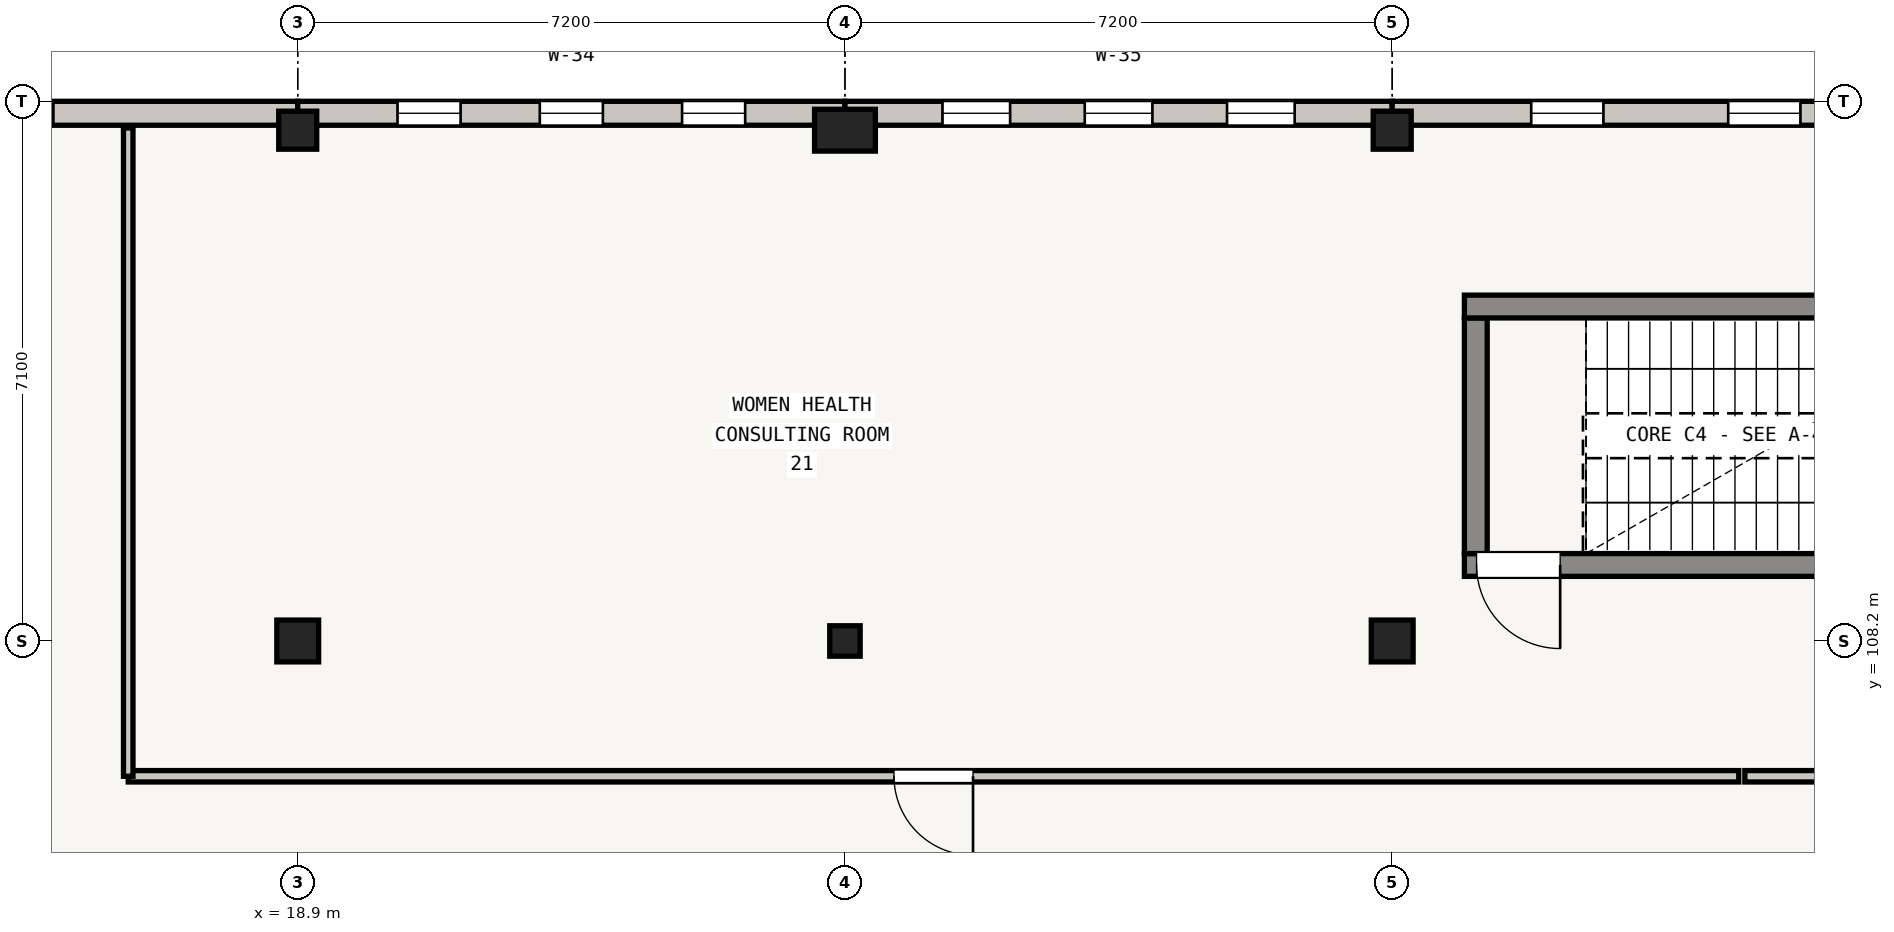
"""IFC4 building model, lengths in metres.
Left out: names, types, materials, properties, quantities, classifications, styles, units other than length and angle.
Written with IfcOpenShell. Run it as: python <this file> out.ifc"""

import sys

from ifc_helpers import new_model, si_unit, direction, frame, frame_2d, origin, origin_2d, place, context, subcontext, project, spatial, rectangle, extrude, element, fill, save


model = new_model("IFC4")
c1 = context("Model", 3, precision=1e-05, world=origin(), true_north=direction((0.0, 1.0)))
c2 = subcontext(c1, "Body", "Model", "MODEL_VIEW")
j1 = project(units=[si_unit("LENGTHUNIT", "METRE"), si_unit("PLANEANGLEUNIT", "RADIAN")], contexts=[c1])
p1 = place(None, origin())
s1 = spatial("IfcSite", under=j1, at=p1, CompositionType="ELEMENT")
p2 = place(p1, origin())
s2 = spatial("IfcBuilding", under=s1, at=p2, CompositionType="ELEMENT")
p3 = place(p2, frame((0.0, 0.0, 8.7)))
s3 = spatial("IfcBuildingStorey", under=s2, at=p3, CompositionType="ELEMENT", Elevation=8.7)
p4 = place(p3, frame((18.9, 108.2, 0.0), z_axis=(0.0, 0.0, 1.0), x_axis=(1.0, 0.0, 0.0)))
e1 = element("IfcColumn", 1, at=p4, inside=s3, PredefinedType="COLUMN", context=c2, shape_type="SweptSolid", body=[
    extrude(rectangle(XDim=0.55, YDim=0.55, at=origin_2d()), origin(), (0.0, 0.0, 1.0), 3.935),
])
p5 = place(p3, frame((18.9, 114.92, 0.0), z_axis=(0.0, 0.0, 1.0), x_axis=(1.0, 0.0, 0.0)))
e2 = element("IfcColumn", 2, at=p5, inside=s3, PredefinedType="COLUMN", context=c2, shape_type="SweptSolid", body=[
    extrude(rectangle(XDim=0.5, YDim=0.5, at=origin_2d()), origin(), (0.0, 0.0, 1.0), 3.935),
])
p6 = place(p3, frame((26.1, 108.2, 0.0), z_axis=(0.0, 0.0, 1.0), x_axis=(1.0, 0.0, 0.0)))
e3 = element("IfcColumn", 3, at=p6, inside=s3, PredefinedType="COLUMN", context=c2, shape_type="SweptSolid", body=[
    extrude(rectangle(XDim=0.4, YDim=0.4, at=origin_2d()), origin(), (0.0, 0.0, 1.0), 3.935),
])
p7 = place(p3, frame((26.1, 114.92, 0.0), z_axis=(0.0, 0.0, 1.0), x_axis=(1.0, 0.0, 0.0)))
e4 = element("IfcColumn", 4, at=p7, inside=s3, PredefinedType="COLUMN", context=c2, shape_type="SweptSolid", body=[
    extrude(rectangle(XDim=0.8, YDim=0.55, at=origin_2d()), origin(), (0.0, 0.0, 1.0), 3.935),
])
p8 = place(p3, frame((33.3, 108.2, 0.0), z_axis=(0.0, 0.0, 1.0), x_axis=(1.0, 0.0, 0.0)))
e5 = element("IfcColumn", 5, at=p8, inside=s3, PredefinedType="COLUMN", context=c2, shape_type="SweptSolid", body=[
    extrude(rectangle(XDim=0.55, YDim=0.55, at=origin_2d()), origin(), (0.0, 0.0, 1.0), 3.935),
])
p9 = place(p3, frame((33.3, 114.92, 0.0), z_axis=(0.0, 0.0, 1.0), x_axis=(1.0, 0.0, 0.0)))
e6 = element("IfcColumn", 6, at=p9, inside=s3, PredefinedType="COLUMN", context=c2, shape_type="SweptSolid", body=[
    extrude(rectangle(XDim=0.5, YDim=0.5, at=origin_2d()), origin(), (0.0, 0.0, 1.0), 3.935),
])
p10 = place(p3, frame((11.7, 115.143, 0.0), z_axis=(0.0, 0.0, 1.0), x_axis=(1.0, 0.0, 0.0)))
e7 = element("IfcWall", 7, at=p10, inside=s3, PredefinedType="SOLIDWALL", context=c2, shape_type="SweptSolid", body=[
    extrude(rectangle(XDim=7.2, YDim=0.315, at=frame_2d((3.6, 0.0))), origin(), (0.0, 0.0, 1.0), 2.97),
])
p11 = place(p10, frame((3.215, 0.0, 0.55)))
e8 = element("IfcOpeningElement", 8, at=p11, cuts=e7, PredefinedType="OPENING", context=c2, shape_type="SweptSolid", body=[
    extrude(rectangle(XDim=0.77, YDim=2.06, at=frame_2d((0.385, 1.03))), frame((0.0, 0.157, 0.0), z_axis=(0.0, -1.0, 0.0), x_axis=(1.0, 0.0, 0.0)), (0.0, 0.0, 1.0), 0.315),
])
p12 = place(p3, frame((18.9, 115.143, 0.0), z_axis=(0.0, 0.0, 1.0), x_axis=(1.0, 0.0, 0.0)))
e9 = element("IfcWall", 9, at=p12, inside=s3, PredefinedType="SOLIDWALL", context=c2, shape_type="SweptSolid", body=[
    extrude(rectangle(XDim=7.2, YDim=0.315, at=frame_2d((3.6, 0.0))), origin(), (0.0, 0.0, 1.0), 2.97),
])
p13 = place(p12, frame((1.313, 0.0, 0.55)))
e10 = element("IfcOpeningElement", 10, at=p13, cuts=e9, PredefinedType="OPENING", context=c2, shape_type="SweptSolid", body=[
    extrude(rectangle(XDim=0.83, YDim=2.06, at=frame_2d((0.415, 1.03))), frame((0.0, 0.157, 0.0), z_axis=(0.0, -1.0, 0.0), x_axis=(1.0, 0.0, 0.0)), (0.0, 0.0, 1.0), 0.315),
])
p14 = place(p12, frame((3.185, 0.0, 0.55)))
e11 = element("IfcOpeningElement", 11, at=p14, cuts=e9, PredefinedType="OPENING", context=c2, shape_type="SweptSolid", body=[
    extrude(rectangle(XDim=0.83, YDim=2.06, at=frame_2d((0.415, 1.03))), frame((0.0, 0.157, 0.0), z_axis=(0.0, -1.0, 0.0), x_axis=(1.0, 0.0, 0.0)), (0.0, 0.0, 1.0), 0.315),
])
p15 = place(p12, frame((5.057, 0.0, 0.55)))
e12 = element("IfcOpeningElement", 12, at=p15, cuts=e9, PredefinedType="OPENING", context=c2, shape_type="SweptSolid", body=[
    extrude(rectangle(XDim=0.83, YDim=2.06, at=frame_2d((0.415, 1.03))), frame((0.0, 0.157, 0.0), z_axis=(0.0, -1.0, 0.0), x_axis=(1.0, 0.0, 0.0)), (0.0, 0.0, 1.0), 0.315),
])
p16 = place(p3, frame((26.1, 115.143, 0.0), z_axis=(0.0, 0.0, 1.0), x_axis=(1.0, 0.0, 0.0)))
e13 = element("IfcWall", 13, at=p16, inside=s3, PredefinedType="SOLIDWALL", context=c2, shape_type="SweptSolid", body=[
    extrude(rectangle(XDim=7.2, YDim=0.315, at=frame_2d((3.6, 0.0))), origin(), (0.0, 0.0, 1.0), 3.3),
])
p17 = place(p16, frame((1.283, 0.0, 0.55)))
e14 = element("IfcOpeningElement", 14, at=p17, cuts=e13, PredefinedType="OPENING", context=c2, shape_type="SweptSolid", body=[
    extrude(rectangle(XDim=0.89, YDim=2.02, at=frame_2d((0.445, 1.01))), frame((0.0, 0.157, 0.0), z_axis=(0.0, -1.0, 0.0), x_axis=(1.0, 0.0, 0.0)), (0.0, 0.0, 1.0), 0.315),
])
p18 = place(p16, frame((3.155, 0.0, 0.55)))
e15 = element("IfcOpeningElement", 15, at=p18, cuts=e13, PredefinedType="OPENING", context=c2, shape_type="SweptSolid", body=[
    extrude(rectangle(XDim=0.89, YDim=2.02, at=frame_2d((0.445, 1.01))), frame((0.0, 0.157, 0.0), z_axis=(0.0, -1.0, 0.0), x_axis=(1.0, 0.0, 0.0)), (0.0, 0.0, 1.0), 0.315),
])
p19 = place(p16, frame((5.027, 0.0, 0.55)))
e16 = element("IfcOpeningElement", 16, at=p19, cuts=e13, PredefinedType="OPENING", context=c2, shape_type="SweptSolid", body=[
    extrude(rectangle(XDim=0.89, YDim=2.02, at=frame_2d((0.445, 1.01))), frame((0.0, 0.157, 0.0), z_axis=(0.0, -1.0, 0.0), x_axis=(1.0, 0.0, 0.0)), (0.0, 0.0, 1.0), 0.315),
])
p20 = place(p3, frame((33.3, 115.143, 0.0), z_axis=(0.0, 0.0, 1.0), x_axis=(1.0, 0.0, 0.0)))
e17 = element("IfcWall", 17, at=p20, inside=s3, PredefinedType="SOLIDWALL", context=c2, shape_type="SweptSolid", body=[
    extrude(rectangle(XDim=7.2, YDim=0.315, at=frame_2d((3.6, 0.0))), origin(), (0.0, 0.0, 1.0), 3.32),
])
p21 = place(p20, frame((1.829, 0.0, 0.55)))
e18 = element("IfcOpeningElement", 18, at=p21, cuts=e17, PredefinedType="OPENING", context=c2, shape_type="SweptSolid", body=[
    extrude(rectangle(XDim=0.95, YDim=2.02, at=frame_2d((0.475, 1.01))), frame((0.0, 0.157, 0.0), z_axis=(0.0, -1.0, 0.0), x_axis=(1.0, 0.0, 0.0)), (0.0, 0.0, 1.0), 0.315),
])
p22 = place(p20, frame((4.421, 0.0, 0.55)))
e19 = element("IfcOpeningElement", 19, at=p22, cuts=e17, PredefinedType="OPENING", context=c2, shape_type="SweptSolid", body=[
    extrude(rectangle(XDim=0.95, YDim=2.02, at=frame_2d((0.475, 1.01))), frame((0.0, 0.157, 0.0), z_axis=(0.0, -1.0, 0.0), x_axis=(1.0, 0.0, 0.0)), (0.0, 0.0, 1.0), 0.315),
])
p23 = place(p3, frame((41.55, 109.2, 0.0), z_axis=(0.0, 0.0, 1.0), x_axis=(-1.0, 0.0, 0.0)))
e20 = element("IfcWall", 20, at=p23, inside=s3, PredefinedType="SHEAR", context=c2, shape_type="SweptSolid", body=[
    extrude(rectangle(XDim=7.3, YDim=0.3, at=frame_2d((3.65, 0.0))), origin(), (0.0, 0.0, 1.0), 3.935),
])
p24 = place(p23, frame((6.04, 0.0, 0.0)))
e21 = element("IfcOpeningElement", 21, at=p24, cuts=e20, PredefinedType="OPENING", context=c2, shape_type="SweptSolid", body=[
    extrude(rectangle(XDim=1.1, YDim=2.05, at=frame_2d((0.55, 1.025))), frame((0.0, 0.15, 0.0), z_axis=(0.0, -1.0, 0.0), x_axis=(1.0, 0.0, 0.0)), (0.0, 0.0, 1.0), 0.3),
])
p25 = place(p3, frame((34.4, 109.35, 0.0), z_axis=(0.0, 0.0, 1.0), x_axis=(0.0, 1.0, 0.0)))
e22 = element("IfcWall", 22, at=p25, inside=s3, PredefinedType="SHEAR", context=c2, shape_type="SweptSolid", body=[
    extrude(rectangle(XDim=3.1, YDim=0.3, at=frame_2d((1.55, 0.0))), origin(), (0.0, 0.0, 1.0), 3.935),
])
p26 = place(p3, frame((34.25, 112.6, 0.0), z_axis=(0.0, 0.0, 1.0), x_axis=(1.0, 0.0, 0.0)))
e23 = element("IfcWall", 23, at=p26, inside=s3, PredefinedType="SHEAR", context=c2, shape_type="SweptSolid", body=[
    extrude(rectangle(XDim=7.3, YDim=0.3, at=frame_2d((3.65, 0.0))), origin(), (0.0, 0.0, 1.0), 3.935),
])
p27 = place(p3, frame((37.86, 106.42, 0.0), z_axis=(0.0, 0.0, 1.0), x_axis=(-1.0, 0.0, 0.0)))
e24 = element("IfcWall", 24, at=p27, inside=s3, PredefinedType="PARTITIONING", context=c2, shape_type="SweptSolid", body=[
    extrude(rectangle(XDim=21.19, YDim=0.15, at=frame_2d((10.595, 0.0))), origin(), (0.0, 0.0, 1.0), 2.955),
])
p28 = place(p27, frame((10.075, 0.0, 0.0)))
e25 = element("IfcOpeningElement", 25, at=p28, cuts=e24, PredefinedType="OPENING", context=c2, shape_type="SweptSolid", body=[
    extrude(rectangle(XDim=1.04, YDim=2.05, at=frame_2d((0.52, 1.025))), frame((0.0, 0.075, 0.0), z_axis=(0.0, -1.0, 0.0), x_axis=(1.0, 0.0, 0.0)), (0.0, 0.0, 1.0), 0.15),
])
p29 = place(p3, frame((16.67, 106.42, 0.0), z_axis=(0.0, 0.0, 1.0), x_axis=(0.0, 1.0, 0.0)))
e26 = element("IfcWall", 26, at=p29, inside=s3, PredefinedType="PARTITIONING", context=c2, shape_type="SweptSolid", body=[
    extrude(rectangle(XDim=8.53, YDim=0.125, at=frame_2d((4.265, 0.0))), origin(), (0.0, 0.0, 1.0), 2.955),
])
p30 = place(p3, frame((47.35, 106.42, 0.0), z_axis=(0.0, 0.0, 1.0), x_axis=(-1.0, 0.0, 0.0)))
e27 = element("IfcWall", 27, at=p30, inside=s3, PredefinedType="PARTITIONING", context=c2, shape_type="SweptSolid", body=[
    extrude(rectangle(XDim=9.41, YDim=0.15, at=frame_2d((4.705, 0.0))), origin(), (0.0, 0.0, 1.0), 2.955),
])
p31 = place(p30, frame((4.185, 0.0, 0.0)))
e28 = element("IfcOpeningElement", 28, at=p31, cuts=e27, PredefinedType="OPENING", context=c2, shape_type="SweptSolid", body=[
    extrude(rectangle(XDim=1.04, YDim=2.05, at=frame_2d((0.52, 1.025))), frame((0.0, 0.075, 0.0), z_axis=(0.0, -1.0, 0.0), x_axis=(1.0, 0.0, 0.0)), (0.0, 0.0, 1.0), 0.15),
])
p32 = place(p11, origin())
e29 = element("IfcWindow", 29, at=p32, inside=s3, PartitioningType="SINGLE_PANEL", PredefinedType="WINDOW", context=c2, shape_type="SweptSolid", body=[
    extrude(rectangle(XDim=0.77, YDim=2.06, at=frame_2d((0.385, 1.03))), frame((0.0, 0.03, 0.0), z_axis=(0.0, -1.0, 0.0), x_axis=(1.0, 0.0, 0.0)), (0.0, 0.0, 1.0), 0.06),
])
fill(e8, e29)
p33 = place(p13, origin())
e30 = element("IfcWindow", 30, at=p33, inside=s3, PartitioningType="SINGLE_PANEL", PredefinedType="WINDOW", context=c2, shape_type="SweptSolid", body=[
    extrude(rectangle(XDim=0.83, YDim=2.06, at=frame_2d((0.415, 1.03))), frame((0.0, 0.03, 0.0), z_axis=(0.0, -1.0, 0.0), x_axis=(1.0, 0.0, 0.0)), (0.0, 0.0, 1.0), 0.06),
])
fill(e10, e30)
p34 = place(p14, origin())
e31 = element("IfcWindow", 31, at=p34, inside=s3, PartitioningType="SINGLE_PANEL", PredefinedType="WINDOW", context=c2, shape_type="SweptSolid", body=[
    extrude(rectangle(XDim=0.83, YDim=2.06, at=frame_2d((0.415, 1.03))), frame((0.0, 0.03, 0.0), z_axis=(0.0, -1.0, 0.0), x_axis=(1.0, 0.0, 0.0)), (0.0, 0.0, 1.0), 0.06),
])
fill(e11, e31)
p35 = place(p15, origin())
e32 = element("IfcWindow", 32, at=p35, inside=s3, PartitioningType="SINGLE_PANEL", PredefinedType="WINDOW", context=c2, shape_type="SweptSolid", body=[
    extrude(rectangle(XDim=0.83, YDim=2.06, at=frame_2d((0.415, 1.03))), frame((0.0, 0.03, 0.0), z_axis=(0.0, -1.0, 0.0), x_axis=(1.0, 0.0, 0.0)), (0.0, 0.0, 1.0), 0.06),
])
fill(e12, e32)
p36 = place(p17, origin())
e33 = element("IfcWindow", 33, at=p36, inside=s3, PartitioningType="DOUBLE_PANEL_VERTICAL", PredefinedType="WINDOW", context=c2, shape_type="SweptSolid", body=[
    extrude(rectangle(XDim=0.89, YDim=2.02, at=frame_2d((0.445, 1.01))), frame((0.0, 0.03, 0.0), z_axis=(0.0, -1.0, 0.0), x_axis=(1.0, 0.0, 0.0)), (0.0, 0.0, 1.0), 0.06),
])
fill(e14, e33)
p37 = place(p18, origin())
e34 = element("IfcWindow", 34, at=p37, inside=s3, PartitioningType="DOUBLE_PANEL_VERTICAL", PredefinedType="WINDOW", context=c2, shape_type="SweptSolid", body=[
    extrude(rectangle(XDim=0.89, YDim=2.02, at=frame_2d((0.445, 1.01))), frame((0.0, 0.03, 0.0), z_axis=(0.0, -1.0, 0.0), x_axis=(1.0, 0.0, 0.0)), (0.0, 0.0, 1.0), 0.06),
])
fill(e15, e34)
p38 = place(p19, origin())
e35 = element("IfcWindow", 35, at=p38, inside=s3, PartitioningType="DOUBLE_PANEL_VERTICAL", PredefinedType="WINDOW", context=c2, shape_type="SweptSolid", body=[
    extrude(rectangle(XDim=0.89, YDim=2.02, at=frame_2d((0.445, 1.01))), frame((0.0, 0.03, 0.0), z_axis=(0.0, -1.0, 0.0), x_axis=(1.0, 0.0, 0.0)), (0.0, 0.0, 1.0), 0.06),
])
fill(e16, e35)
p39 = place(p21, origin())
e36 = element("IfcWindow", 36, at=p39, inside=s3, PartitioningType="DOUBLE_PANEL_VERTICAL", PredefinedType="WINDOW", context=c2, shape_type="SweptSolid", body=[
    extrude(rectangle(XDim=0.95, YDim=2.02, at=frame_2d((0.475, 1.01))), frame((0.0, 0.03, 0.0), z_axis=(0.0, -1.0, 0.0), x_axis=(1.0, 0.0, 0.0)), (0.0, 0.0, 1.0), 0.06),
])
fill(e18, e36)
p40 = place(p22, origin())
e37 = element("IfcWindow", 37, at=p40, inside=s3, PartitioningType="DOUBLE_PANEL_VERTICAL", PredefinedType="WINDOW", context=c2, shape_type="SweptSolid", body=[
    extrude(rectangle(XDim=0.95, YDim=2.02, at=frame_2d((0.475, 1.01))), frame((0.0, 0.03, 0.0), z_axis=(0.0, -1.0, 0.0), x_axis=(1.0, 0.0, 0.0)), (0.0, 0.0, 1.0), 0.06),
])
fill(e19, e37)
p41 = place(p24, origin())
e38 = element("IfcDoor", 38, at=p41, inside=s3, OperationType="SINGLE_SWING_LEFT", PredefinedType="DOOR", context=c2, shape_type="SweptSolid", body=[
    extrude(rectangle(XDim=1.1, YDim=2.05, at=frame_2d((0.55, 1.025))), frame((0.0, 0.025, 0.0), z_axis=(0.0, -1.0, 0.0), x_axis=(1.0, 0.0, 0.0)), (0.0, 0.0, 1.0), 0.05),
])
fill(e21, e38)
p42 = place(p28, origin())
e39 = element("IfcDoor", 39, at=p42, inside=s3, OperationType="SINGLE_SWING_LEFT", PredefinedType="DOOR", context=c2, shape_type="SweptSolid", body=[
    extrude(rectangle(XDim=1.04, YDim=2.05, at=frame_2d((0.52, 1.025))), frame((0.0, 0.025, 0.0), z_axis=(0.0, -1.0, 0.0), x_axis=(1.0, 0.0, 0.0)), (0.0, 0.0, 1.0), 0.05),
])
fill(e25, e39)
save(model, sys.argv[1])
